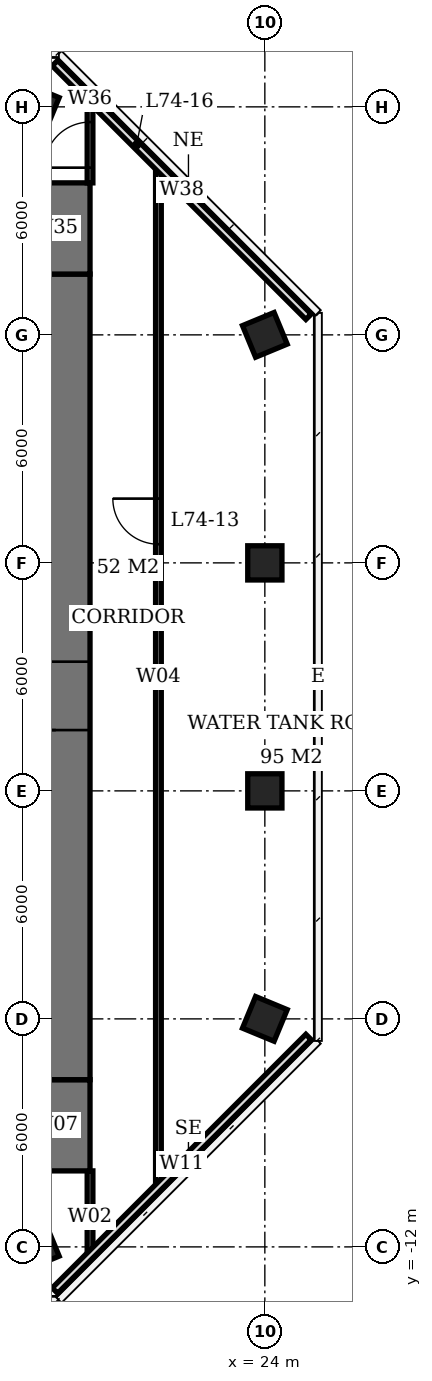
"""IFC4 building model, lengths in metres.
Left out: names, types, materials, properties, quantities, classifications, styles, units other than length and angle.
Written with IfcOpenShell. Run it as: python <this file> out.ifc"""

import sys

from ifc_helpers import new_model, si_unit, direction, frame, frame_2d, origin, origin_2d, place, context, subcontext, project, spatial, rectangle, extrude, element, fill, save


model = new_model("IFC4")
c1 = context("Model", 3, precision=1e-05, world=origin(), true_north=direction((0.0, 1.0)))
c2 = subcontext(c1, "Body", "Model", "MODEL_VIEW")
j1 = project(units=[si_unit("LENGTHUNIT", "METRE"), si_unit("PLANEANGLEUNIT", "RADIAN")], contexts=[c1])
p1 = place(None, origin())
s1 = spatial("IfcSite", under=j1, at=p1, CompositionType="ELEMENT")
p2 = place(p1, origin())
s2 = spatial("IfcBuilding", under=s1, at=p2, CompositionType="ELEMENT")
p3 = place(p2, frame((0.0, 0.0, 300.7)))
s3 = spatial("IfcBuildingStorey", under=s2, at=p3, CompositionType="ELEMENT", Elevation=300.7)
for number, where, z_axis, x_axis in (
    (1, (18.0, -12.0, 0.0), (0.0, 0.0, 1.0), (-0.924, -0.383, 0.0)),
    (2, (18.0, 18.0, 0.0), (0.0, 0.0, 1.0), (0.924, -0.383, 0.0)),
    (3, (24.0, -6.0, 0.0), (0.0, 0.0, 1.0), (-0.383, -0.924, 0.0)),
    (4, (24.0, 0.0, 0.0), (0.0, 0.0, 1.0), (0.0, 1.0, 0.0)),
    (5, (24.0, 6.0, 0.0), (0.0, 0.0, 1.0), (0.0, 1.0, 0.0)),
    (6, (24.0, 12.0, 0.0), (0.0, 0.0, 1.0), (0.383, -0.924, 0.0)),
):
    element("IfcColumn", number, at=place(p3, frame(where, z_axis=z_axis, x_axis=x_axis)), inside=s3, PredefinedType="COLUMN", context=c2, shape_type="SweptSolid", body=[
        extrude(rectangle(XDim=0.9, YDim=0.9, at=origin_2d()), origin(), (0.0, 0.0, 1.0), 5.0),
    ])
p4 = place(p3, frame((18.5, -7.6, 0.0), z_axis=(0.0, 0.0, 1.0), x_axis=(0.0, 1.0, 0.0)))
e7 = element("IfcWall", 7, at=p4, inside=s3, PredefinedType="SHEAR", context=c2, shape_type="SweptSolid", body=[
    extrude(rectangle(XDim=21.2, YDim=1.8, at=frame_2d((10.6, 0.0))), origin(), (0.0, 0.0, 1.0), 5.0),
])
p5 = place(p4, frame((9.2, 0.0, 0.0)))
e8 = element("IfcOpeningElement", 8, at=p5, cuts=e7, PredefinedType="OPENING", context=c2, shape_type="SweptSolid", body=[
    extrude(rectangle(XDim=1.8, YDim=2.4, at=frame_2d((0.9, 1.2))), frame((0.0, 0.91, 0.0), z_axis=(0.0, -1.0, 0.0), x_axis=(1.0, 0.0, 0.0)), (0.0, 0.0, 1.0), 1.82),
])
for number, where, z_axis, x_axis in (
    (9, (18.5, -10.0, 0.0), (0.0, 0.0, 1.0), (0.0, 1.0, 0.0)),
    (10, (18.5, 13.6, 0.0), (0.0, 0.0, 1.0), (0.0, 1.0, 0.0)),
):
    element("IfcWall", number, at=place(p3, frame(where, z_axis=z_axis, x_axis=x_axis)), inside=s3, PredefinedType="SHEAR", context=c2, shape_type="SweptSolid", body=[
        extrude(rectangle(XDim=2.4, YDim=1.8, at=frame_2d((1.2, 0.0))), origin(), (0.0, 0.0, 1.0), 5.0),
    ])
for number, where, z_axis, x_axis in (
    (11, (25.15, -6.476, 6.1), (0.0, 0.0, 1.0), (-0.707, -0.707, 0.0)),
    (12, (18.476, 19.15, 6.1), (0.0, 0.0, 1.0), (0.707, -0.707, 0.0)),
):
    element("IfcWall", number, at=place(p3, frame(where, z_axis=z_axis, x_axis=x_axis)), inside=s3, PredefinedType="USERDEFINED", context=c2, shape_type="SweptSolid", body=[
        extrude(rectangle(XDim=9.438, YDim=0.2, at=frame_2d((4.719, 0.0))), origin(), (0.0, 0.0, 1.0), 1.9),
    ])
p6 = place(p3, frame((19.4, -12.439, 0.0), z_axis=(0.0, 0.0, 1.0), x_axis=(0.0, 1.0, 0.0)))
e13 = element("IfcWall", 13, at=p6, inside=s3, PredefinedType="PARTITIONING", context=c2, shape_type="SweptSolid", body=[
    extrude(rectangle(XDim=2.439, YDim=0.15, at=frame_2d((1.219, 0.0))), origin(), (0.0, 0.0, 1.0), 4.75),
])
p7 = place(p3, frame((19.4, 16.0, 0.0), z_axis=(0.0, 0.0, 1.0), x_axis=(0.0, 1.0, 0.0)))
e14 = element("IfcWall", 14, at=p7, inside=s3, PredefinedType="PARTITIONING", context=c2, shape_type="SweptSolid", body=[
    extrude(rectangle(XDim=2.439, YDim=0.15, at=frame_2d((1.219, 0.0))), origin(), (0.0, 0.0, 1.0), 4.75),
])
p8 = place(p7, frame((0.4, 0.0, 0.0)))
e15 = element("IfcOpeningElement", 15, at=p8, cuts=e14, PredefinedType="OPENING", context=c2, shape_type="SweptSolid", body=[
    extrude(rectangle(XDim=1.2, YDim=2.4, at=frame_2d((0.6, 1.2))), frame((0.0, 0.085, 0.0), z_axis=(0.0, -1.0, 0.0), x_axis=(1.0, 0.0, 0.0)), (0.0, 0.0, 1.0), 0.17),
])
p9 = place(p3, frame((21.2, -10.639, 0.0), z_axis=(0.0, 0.0, 1.0), x_axis=(0.0, 1.0, 0.0)))
e16 = element("IfcWall", 16, at=p9, inside=s3, PredefinedType="PARTITIONING", context=c2, shape_type="SweptSolid", body=[
    extrude(rectangle(XDim=27.278, YDim=0.15, at=frame_2d((13.639, 0.0))), origin(), (0.0, 0.0, 1.0), 4.75),
])
p10 = place(p9, frame((17.13, 0.0, 0.0)))
e17 = element("IfcOpeningElement", 17, at=p10, cuts=e16, PredefinedType="OPENING", context=c2, shape_type="SweptSolid", body=[
    extrude(rectangle(XDim=1.2, YDim=2.4, at=frame_2d((0.6, 1.2))), frame((0.0, 0.085, 0.0), z_axis=(0.0, -1.0, 0.0), x_axis=(1.0, 0.0, 0.0)), (0.0, 0.0, 1.0), 0.17),
])
p11 = place(p5, origin())
e18 = element("IfcDoor", 18, at=p11, inside=s3, OperationType="DOUBLE_DOOR_SINGLE_SWING", PredefinedType="DOOR", context=c2, shape_type="SweptSolid", body=[
    extrude(rectangle(XDim=1.8, YDim=2.4, at=frame_2d((0.9, 1.2))), frame((0.0, 0.025, 0.0), z_axis=(0.0, -1.0, 0.0), x_axis=(1.0, 0.0, 0.0)), (0.0, 0.0, 1.0), 0.05),
])
fill(e8, e18)
p12 = place(p10, origin())
e19 = element("IfcDoor", 19, at=p12, inside=s3, OperationType="SINGLE_SWING_RIGHT", PredefinedType="DOOR", context=c2, shape_type="SweptSolid", body=[
    extrude(rectangle(XDim=1.2, YDim=2.4, at=frame_2d((0.6, 1.2))), frame((0.0, 0.025, 0.0), z_axis=(0.0, -1.0, 0.0), x_axis=(1.0, 0.0, 0.0)), (0.0, 0.0, 1.0), 0.05),
])
fill(e17, e19)
p13 = place(p8, origin())
e20 = element("IfcDoor", 20, at=p13, inside=s3, OperationType="SINGLE_SWING_LEFT", PredefinedType="DOOR", context=c2, shape_type="SweptSolid", body=[
    extrude(rectangle(XDim=1.2, YDim=2.4, at=frame_2d((0.6, 1.2))), frame((0.0, 0.025, 0.0), z_axis=(0.0, -1.0, 0.0), x_axis=(1.0, 0.0, 0.0)), (0.0, 0.0, 1.0), 0.05),
])
fill(e15, e20)
save(model, sys.argv[1])
